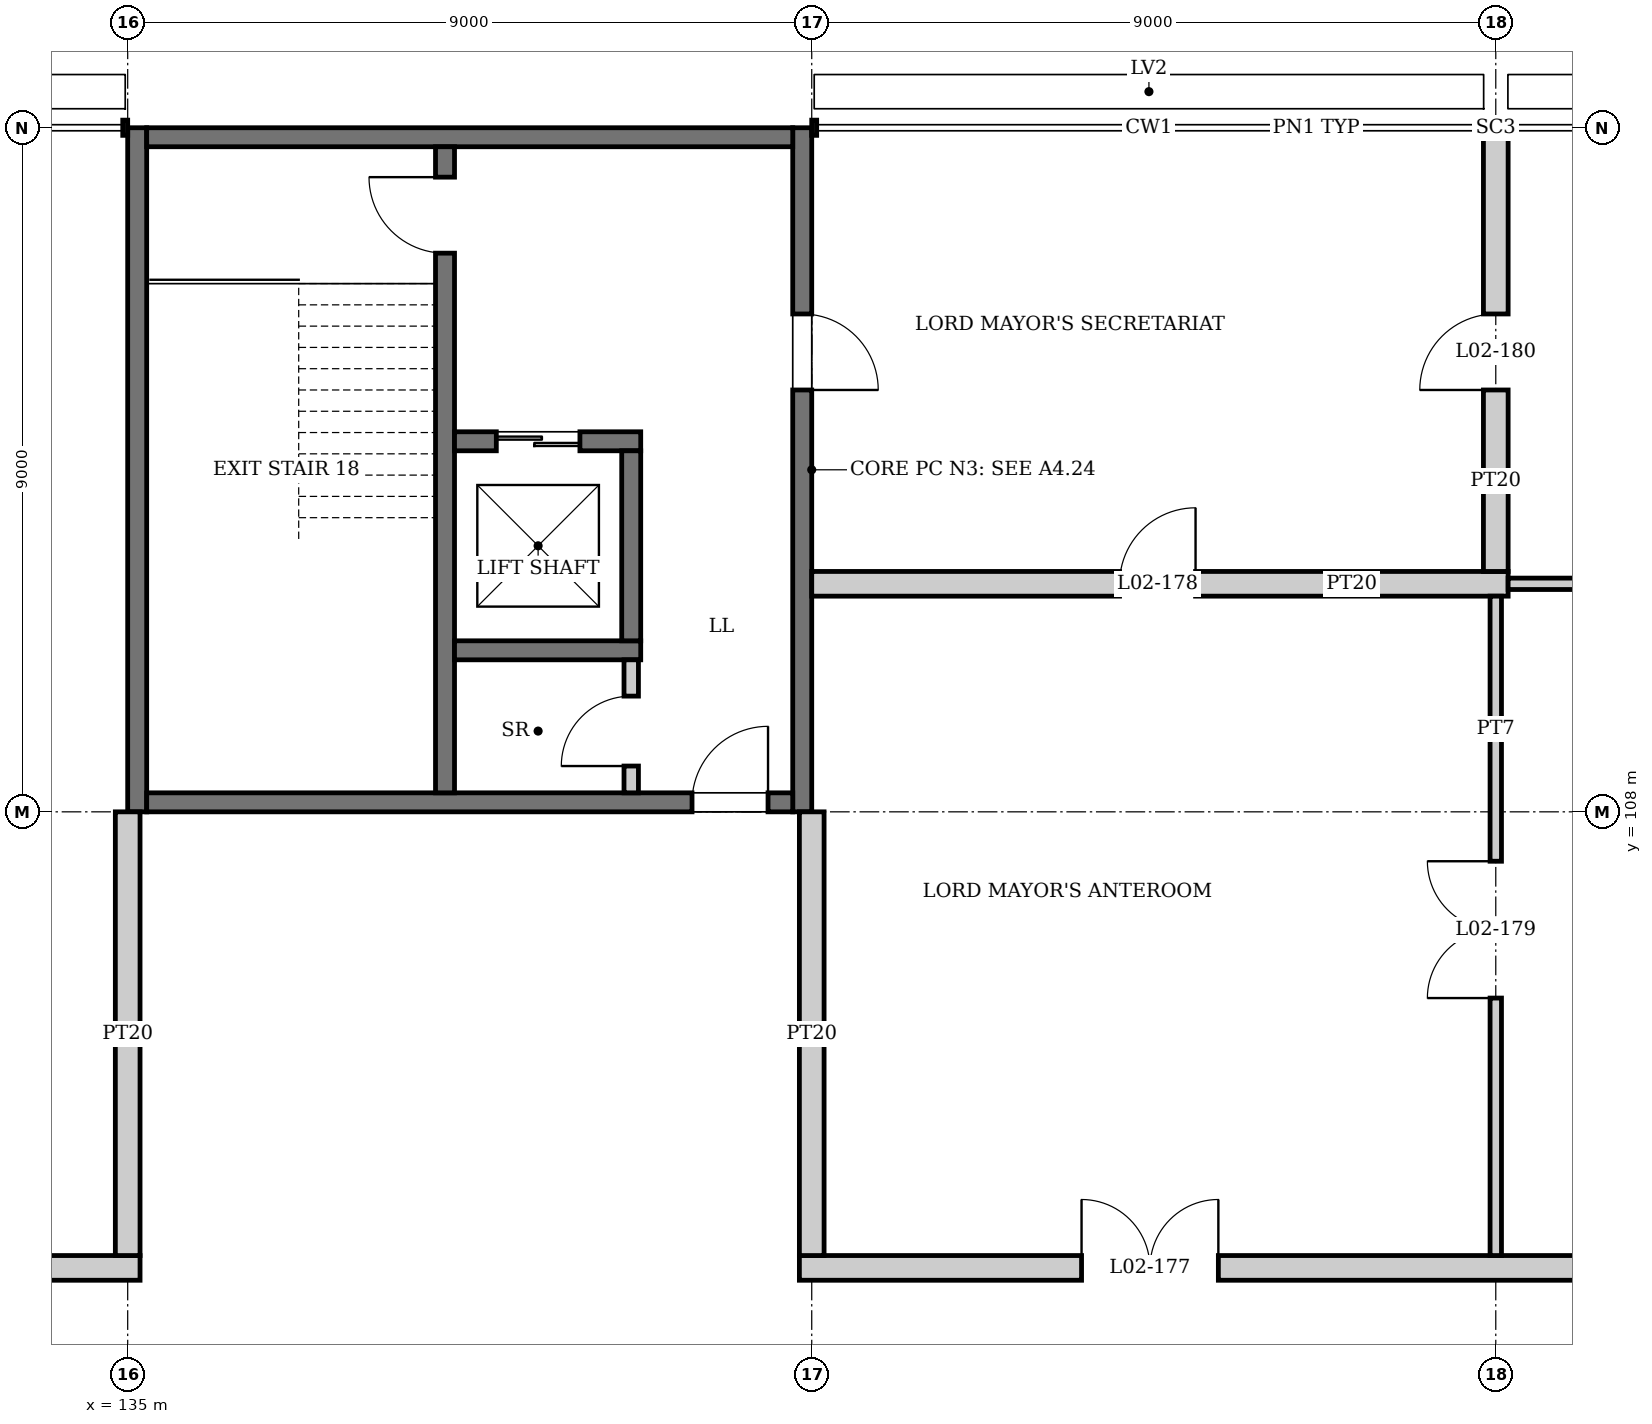
"""IFC4 building model, lengths in metres.
Left out: names, types, materials, properties, quantities, classifications, styles, units other than length and angle.
Written with IfcOpenShell. Run it as: python <this file> out.ifc"""

import sys

from ifc_helpers import new_model, si_unit, direction, frame, frame_2d, origin, origin_2d, place, context, subcontext, project, spatial, rectangle, i_section, extrude, element, fill, save


model = new_model("IFC4")
c1 = context("Model", 3, precision=1e-05, world=origin(), true_north=direction((0.0, 1.0)))
c2 = subcontext(c1, "Body", "Model", "MODEL_VIEW")
j1 = project(units=[si_unit("LENGTHUNIT", "METRE"), si_unit("PLANEANGLEUNIT", "RADIAN")], contexts=[c1])
p1 = place(None, origin())
s1 = spatial("IfcSite", under=j1, at=p1, CompositionType="ELEMENT")
p2 = place(p1, origin())
s2 = spatial("IfcBuilding", under=s1, at=p2, CompositionType="ELEMENT")
p3 = place(p2, frame((0.0, 0.0, 10.5)))
s3 = spatial("IfcBuildingStorey", under=s2, at=p3, CompositionType="ELEMENT", Elevation=10.5)
p4 = place(p3, frame((153.0, 117.0, 0.0), z_axis=(0.0, 0.0, 1.0), x_axis=(0.0, 1.0, 0.0)))
e1 = element("IfcColumn", 1, at=p4, inside=s3, PredefinedType="COLUMN", context=c2, shape_type="SweptSolid", body=[
    extrude(i_section(OverallWidth=0.254, OverallDepth=0.254, WebThickness=0.009, FlangeThickness=0.014, at=origin_2d()), origin(), (0.0, 0.0, 1.0), 4.5),
])
p5 = place(p3, frame((135.125, 108.0, 0.0), z_axis=(0.0, 0.0, 1.0), x_axis=(0.0, 1.0, 0.0)))
e2 = element("IfcWall", 2, at=p5, inside=s3, PredefinedType="SHEAR", context=c2, shape_type="SweptSolid", body=[
    extrude(rectangle(XDim=9.0, YDim=0.25, at=frame_2d((4.5, 0.0))), origin(), (0.0, 0.0, 1.0), 4.35),
])
p6 = place(p3, frame((143.875, 108.0, 0.0), z_axis=(0.0, 0.0, 1.0), x_axis=(0.0, 1.0, 0.0)))
e3 = element("IfcWall", 3, at=p6, inside=s3, PredefinedType="SHEAR", context=c2, shape_type="SweptSolid", body=[
    extrude(rectangle(XDim=9.0, YDim=0.25, at=frame_2d((4.5, 0.0))), origin(), (0.0, 0.0, 1.0), 4.35),
])
p7 = place(p6, frame((5.55, 0.0, 0.0)))
e4 = element("IfcOpeningElement", 4, at=p7, cuts=e3, PredefinedType="OPENING", context=c2, shape_type="SweptSolid", body=[
    extrude(rectangle(XDim=1.0, YDim=2.1, at=frame_2d((0.5, 1.05))), frame((0.0, 0.135, 0.0), z_axis=(0.0, -1.0, 0.0), x_axis=(1.0, 0.0, 0.0)), (0.0, 0.0, 1.0), 0.27),
])
p8 = place(p3, frame((135.25, 108.125, 0.0), z_axis=(0.0, 0.0, 1.0), x_axis=(1.0, 0.0, 0.0)))
e5 = element("IfcWall", 5, at=p8, inside=s3, PredefinedType="SHEAR", context=c2, shape_type="SweptSolid", body=[
    extrude(rectangle(XDim=8.5, YDim=0.25, at=frame_2d((4.25, 0.0))), origin(), (0.0, 0.0, 1.0), 4.35),
])
p9 = place(p8, frame((7.175, 0.0, 0.0)))
e6 = element("IfcOpeningElement", 6, at=p9, cuts=e5, PredefinedType="OPENING", context=c2, shape_type="SweptSolid", body=[
    extrude(rectangle(XDim=1.0, YDim=2.1, at=frame_2d((0.5, 1.05))), frame((0.0, 0.135, 0.0), z_axis=(0.0, -1.0, 0.0), x_axis=(1.0, 0.0, 0.0)), (0.0, 0.0, 1.0), 0.27),
])
p10 = place(p3, frame((135.25, 116.875, 0.0), z_axis=(0.0, 0.0, 1.0), x_axis=(1.0, 0.0, 0.0)))
e7 = element("IfcWall", 7, at=p10, inside=s3, PredefinedType="SHEAR", context=c2, shape_type="SweptSolid", body=[
    extrude(rectangle(XDim=8.5, YDim=0.25, at=frame_2d((4.25, 0.0))), origin(), (0.0, 0.0, 1.0), 4.35),
])
p11 = place(p3, frame((139.175, 116.75, 0.0), z_axis=(0.0, 0.0, 1.0), x_axis=(0.0, -1.0, 0.0)))
e8 = element("IfcWall", 8, at=p11, inside=s3, PredefinedType="SOLIDWALL", context=c2, shape_type="SweptSolid", body=[
    extrude(rectangle(XDim=8.5, YDim=0.25, at=frame_2d((4.25, 0.0))), origin(), (0.0, 0.0, 1.0), 4.35),
])
p12 = place(p11, frame((0.4, 0.0, 0.0)))
e9 = element("IfcOpeningElement", 9, at=p12, cuts=e8, PredefinedType="OPENING", context=c2, shape_type="SweptSolid", body=[
    extrude(rectangle(XDim=1.0, YDim=2.1, at=frame_2d((0.5, 1.05))), frame((0.0, 0.135, 0.0), z_axis=(0.0, -1.0, 0.0), x_axis=(1.0, 0.0, 0.0)), (0.0, 0.0, 1.0), 0.27),
])
p13 = place(p3, frame((139.3, 110.125, 0.0), z_axis=(0.0, 0.0, 1.0), x_axis=(1.0, 0.0, 0.0)))
e10 = element("IfcWall", 10, at=p13, inside=s3, PredefinedType="SOLIDWALL", context=c2, shape_type="SweptSolid", body=[
    extrude(rectangle(XDim=2.45, YDim=0.25, at=frame_2d((1.225, 0.0))), origin(), (0.0, 0.0, 1.0), 4.35),
])
p14 = place(p3, frame((139.3, 112.875, 0.0), z_axis=(0.0, 0.0, 1.0), x_axis=(1.0, 0.0, 0.0)))
e11 = element("IfcWall", 11, at=p14, inside=s3, PredefinedType="SOLIDWALL", context=c2, shape_type="SweptSolid", body=[
    extrude(rectangle(XDim=2.45, YDim=0.25, at=frame_2d((1.225, 0.0))), origin(), (0.0, 0.0, 1.0), 4.35),
])
p15 = place(p14, frame((0.55, 0.0, 0.0)))
e12 = element("IfcOpeningElement", 12, at=p15, cuts=e11, PredefinedType="OPENING", context=c2, shape_type="SweptSolid", body=[
    extrude(rectangle(XDim=1.1, YDim=2.1, at=frame_2d((0.55, 1.05))), frame((0.0, 0.135, 0.0), z_axis=(0.0, -1.0, 0.0), x_axis=(1.0, 0.0, 0.0)), (0.0, 0.0, 1.0), 0.27),
])
p16 = place(p3, frame((141.625, 110.25, 0.0), z_axis=(0.0, 0.0, 1.0), x_axis=(0.0, 1.0, 0.0)))
e13 = element("IfcWall", 13, at=p16, inside=s3, PredefinedType="SOLIDWALL", context=c2, shape_type="SweptSolid", body=[
    extrude(rectangle(XDim=2.5, YDim=0.25, at=frame_2d((1.25, 0.0))), origin(), (0.0, 0.0, 1.0), 4.35),
])
p17 = place(p3, frame((107.837, 102.0, 0.0), z_axis=(0.0, 0.0, 1.0), x_axis=(1.0, 0.0, 0.0)))
e14 = element("IfcWall", 14, at=p17, inside=s3, PredefinedType="PARTITIONING", context=c2, shape_type="SweptSolid", body=[
    extrude(rectangle(XDim=27.325, YDim=0.325, at=frame_2d((13.663, 0.0))), origin(), (0.0, 0.0, 1.0), 3.65),
])
p18 = place(p17, frame((5.962, 0.0, 0.0)))
e15 = element("IfcOpeningElement", 15, at=p18, cuts=e14, PredefinedType="OPENING", context=c2, shape_type="SweptSolid", body=[
    extrude(rectangle(XDim=1.8, YDim=2.4, at=frame_2d((0.9, 1.2))), frame((0.0, 0.172, 0.0), z_axis=(0.0, -1.0, 0.0), x_axis=(1.0, 0.0, 0.0)), (0.0, 0.0, 1.0), 0.345),
])
p19 = place(p17, frame((19.462, 0.0, 0.0)))
e16 = element("IfcOpeningElement", 16, at=p19, cuts=e14, PredefinedType="OPENING", context=c2, shape_type="SweptSolid", body=[
    extrude(rectangle(XDim=1.8, YDim=2.4, at=frame_2d((0.9, 1.2))), frame((0.0, 0.172, 0.0), z_axis=(0.0, -1.0, 0.0), x_axis=(1.0, 0.0, 0.0)), (0.0, 0.0, 1.0), 0.345),
])
p20 = place(p3, frame((143.837, 102.0, 0.0), z_axis=(0.0, 0.0, 1.0), x_axis=(1.0, 0.0, 0.0)))
e17 = element("IfcWall", 17, at=p20, inside=s3, PredefinedType="PARTITIONING", context=c2, shape_type="SweptSolid", body=[
    extrude(rectangle(XDim=27.325, YDim=0.325, at=frame_2d((13.663, 0.0))), origin(), (0.0, 0.0, 1.0), 3.65),
])
p21 = place(p20, frame((3.712, 0.0, 0.0)))
e18 = element("IfcOpeningElement", 18, at=p21, cuts=e17, PredefinedType="OPENING", context=c2, shape_type="SweptSolid", body=[
    extrude(rectangle(XDim=1.8, YDim=2.4, at=frame_2d((0.9, 1.2))), frame((0.0, 0.172, 0.0), z_axis=(0.0, -1.0, 0.0), x_axis=(1.0, 0.0, 0.0)), (0.0, 0.0, 1.0), 0.345),
])
p22 = place(p3, frame((144.0, 111.0, 0.0), z_axis=(0.0, 0.0, 1.0), x_axis=(1.0, 0.0, 0.0)))
e19 = element("IfcWall", 19, at=p22, inside=s3, PredefinedType="PARTITIONING", context=c2, shape_type="SweptSolid", body=[
    extrude(rectangle(XDim=9.163, YDim=0.325, at=frame_2d((4.581, 0.0))), origin(), (0.0, 0.0, 1.0), 3.65),
])
p23 = place(p22, frame((4.05, 0.0, 0.0)))
e20 = element("IfcOpeningElement", 20, at=p23, cuts=e19, PredefinedType="OPENING", context=c2, shape_type="SweptSolid", body=[
    extrude(rectangle(XDim=1.0, YDim=2.1, at=frame_2d((0.5, 1.05))), frame((0.0, 0.172, 0.0), z_axis=(0.0, -1.0, 0.0), x_axis=(1.0, 0.0, 0.0)), (0.0, 0.0, 1.0), 0.345),
])
p24 = place(p3, frame((153.163, 111.0, 0.0), z_axis=(0.0, 0.0, 1.0), x_axis=(1.0, 0.0, 0.0)))
e21 = element("IfcWall", 21, at=p24, inside=s3, PredefinedType="PARTITIONING", context=c2, shape_type="SweptSolid", body=[
    extrude(rectangle(XDim=17.837, YDim=0.15, at=frame_2d((8.919, 0.0))), origin(), (0.0, 0.0, 1.0), 3.65),
])
p25 = place(p24, frame((8.387, 0.0, 0.0)))
e22 = element("IfcOpeningElement", 22, at=p25, cuts=e21, PredefinedType="OPENING", context=c2, shape_type="SweptSolid", body=[
    extrude(rectangle(XDim=1.0, YDim=2.1, at=frame_2d((0.5, 1.05))), frame((0.0, 0.085, 0.0), z_axis=(0.0, -1.0, 0.0), x_axis=(1.0, 0.0, 0.0)), (0.0, 0.0, 1.0), 0.17),
])
p26 = place(p3, frame((135.0, 102.163, 0.0), z_axis=(0.0, 0.0, 1.0), x_axis=(0.0, 1.0, 0.0)))
e23 = element("IfcWall", 23, at=p26, inside=s3, PredefinedType="PARTITIONING", context=c2, shape_type="SweptSolid", body=[
    extrude(rectangle(XDim=5.837, YDim=0.325, at=frame_2d((2.919, 0.0))), origin(), (0.0, 0.0, 1.0), 3.998),
])
p27 = place(p3, frame((141.625, 108.25, 0.0), z_axis=(0.0, 0.0, 1.0), x_axis=(0.0, 1.0, 0.0)))
e24 = element("IfcWall", 24, at=p27, inside=s3, PredefinedType="PARTITIONING", context=c2, shape_type="SweptSolid", body=[
    extrude(rectangle(XDim=1.75, YDim=0.19, at=frame_2d((0.875, 0.0))), origin(), (0.0, 0.0, 1.0), 4.35),
])
p28 = place(p27, frame((0.353, 0.0, 0.0)))
e25 = element("IfcOpeningElement", 25, at=p28, cuts=e24, PredefinedType="OPENING", context=c2, shape_type="SweptSolid", body=[
    extrude(rectangle(XDim=0.92, YDim=2.1, at=frame_2d((0.46, 1.05))), frame((0.0, 0.105, 0.0), z_axis=(0.0, -1.0, 0.0), x_axis=(1.0, 0.0, 0.0)), (0.0, 0.0, 1.0), 0.21),
])
p29 = place(p3, frame((144.0, 102.163, 0.0), z_axis=(0.0, 0.0, 1.0), x_axis=(0.0, 1.0, 0.0)))
e26 = element("IfcWall", 26, at=p29, inside=s3, PredefinedType="PARTITIONING", context=c2, shape_type="SweptSolid", body=[
    extrude(rectangle(XDim=5.837, YDim=0.325, at=frame_2d((2.919, 0.0))), origin(), (0.0, 0.0, 1.0), 3.998),
])
p30 = place(p3, frame((153.0, 102.163, 0.0), z_axis=(0.0, 0.0, 1.0), x_axis=(0.0, 1.0, 0.0)))
e27 = element("IfcWall", 27, at=p30, inside=s3, PredefinedType="PARTITIONING", context=c2, shape_type="SweptSolid", body=[
    extrude(rectangle(XDim=8.675, YDim=0.15, at=frame_2d((4.337, 0.0))), origin(), (0.0, 0.0, 1.0), 3.65),
])
p31 = place(p30, frame((3.387, 0.0, 0.0)))
e28 = element("IfcOpeningElement", 28, at=p31, cuts=e27, PredefinedType="OPENING", context=c2, shape_type="SweptSolid", body=[
    extrude(rectangle(XDim=1.8, YDim=2.4, at=frame_2d((0.9, 1.2))), frame((0.0, 0.085, 0.0), z_axis=(0.0, -1.0, 0.0), x_axis=(1.0, 0.0, 0.0)), (0.0, 0.0, 1.0), 0.17),
])
p32 = place(p3, frame((153.0, 111.163, 0.0), z_axis=(0.0, 0.0, 1.0), x_axis=(0.0, 1.0, 0.0)))
e29 = element("IfcWall", 29, at=p32, inside=s3, PredefinedType="PARTITIONING", context=c2, shape_type="SweptSolid", body=[
    extrude(rectangle(XDim=5.71, YDim=0.325, at=frame_2d((2.855, 0.0))), origin(), (0.0, 0.0, 1.0), 3.65),
])
p33 = place(p32, frame((2.387, 0.0, 0.0)))
e30 = element("IfcOpeningElement", 30, at=p33, cuts=e29, PredefinedType="OPENING", context=c2, shape_type="SweptSolid", body=[
    extrude(rectangle(XDim=1.0, YDim=2.1, at=frame_2d((0.5, 1.05))), frame((0.0, 0.172, 0.0), z_axis=(0.0, -1.0, 0.0), x_axis=(1.0, 0.0, 0.0)), (0.0, 0.0, 1.0), 0.345),
])
p34 = place(p15, origin())
e31 = element("IfcDoor", 31, at=p34, inside=s3, OperationType="DOUBLE_DOOR_SLIDING", PredefinedType="DOOR", context=c2, shape_type="SweptSolid", body=[
    extrude(rectangle(XDim=1.1, YDim=2.1, at=frame_2d((0.55, 1.05))), frame((0.0, 0.025, 0.0), z_axis=(0.0, -1.0, 0.0), x_axis=(1.0, 0.0, 0.0)), (0.0, 0.0, 1.0), 0.05),
])
fill(e12, e31)
p35 = place(p12, frame((1.0, 0.0, 0.0), z_axis=(0.0, 0.0, 1.0), x_axis=(-1.0, 0.0, 0.0)))
e32 = element("IfcDoor", 32, at=p35, inside=s3, OperationType="SINGLE_SWING_RIGHT", PredefinedType="DOOR", context=c2, shape_type="SweptSolid", body=[
    extrude(rectangle(XDim=1.0, YDim=2.1, at=frame_2d((0.5, 1.05))), frame((0.0, 0.025, 0.0), z_axis=(0.0, -1.0, 0.0), x_axis=(1.0, 0.0, 0.0)), (0.0, 0.0, 1.0), 0.05),
])
fill(e9, e32)
p36 = place(p28, origin())
e33 = element("IfcDoor", 33, at=p36, inside=s3, OperationType="SINGLE_SWING_LEFT", PredefinedType="DOOR", context=c2, shape_type="SweptSolid", body=[
    extrude(rectangle(XDim=0.92, YDim=2.1, at=frame_2d((0.46, 1.05))), frame((0.0, 0.025, 0.0), z_axis=(0.0, -1.0, 0.0), x_axis=(1.0, 0.0, 0.0)), (0.0, 0.0, 1.0), 0.05),
])
fill(e25, e33)
p37 = place(p9, origin())
e34 = element("IfcDoor", 34, at=p37, inside=s3, OperationType="SINGLE_SWING_RIGHT", PredefinedType="DOOR", context=c2, shape_type="SweptSolid", body=[
    extrude(rectangle(XDim=1.0, YDim=2.1, at=frame_2d((0.5, 1.05))), frame((0.0, 0.025, 0.0), z_axis=(0.0, -1.0, 0.0), x_axis=(1.0, 0.0, 0.0)), (0.0, 0.0, 1.0), 0.05),
])
fill(e6, e34)
p38 = place(p7, frame((1.0, 0.0, 0.0), z_axis=(0.0, 0.0, 1.0), x_axis=(-1.0, 0.0, 0.0)))
e35 = element("IfcDoor", 35, at=p38, inside=s3, OperationType="SINGLE_SWING_RIGHT", PredefinedType="DOOR", context=c2, shape_type="SweptSolid", body=[
    extrude(rectangle(XDim=1.0, YDim=2.1, at=frame_2d((0.5, 1.05))), frame((0.0, 0.025, 0.0), z_axis=(0.0, -1.0, 0.0), x_axis=(1.0, 0.0, 0.0)), (0.0, 0.0, 1.0), 0.05),
])
fill(e4, e35)
p39 = place(p21, origin())
e36 = element("IfcDoor", 36, at=p39, inside=s3, OperationType="DOUBLE_DOOR_SINGLE_SWING", PredefinedType="DOOR", context=c2, shape_type="SweptSolid", body=[
    extrude(rectangle(XDim=1.8, YDim=2.4, at=frame_2d((0.9, 1.2))), frame((0.0, 0.025, 0.0), z_axis=(0.0, -1.0, 0.0), x_axis=(1.0, 0.0, 0.0)), (0.0, 0.0, 1.0), 0.05),
])
fill(e18, e36)
p40 = place(p23, origin())
e37 = element("IfcDoor", 37, at=p40, inside=s3, OperationType="SINGLE_SWING_RIGHT", PredefinedType="DOOR", context=c2, shape_type="SweptSolid", body=[
    extrude(rectangle(XDim=1.0, YDim=2.1, at=frame_2d((0.5, 1.05))), frame((0.0, 0.025, 0.0), z_axis=(0.0, -1.0, 0.0), x_axis=(1.0, 0.0, 0.0)), (0.0, 0.0, 1.0), 0.05),
])
fill(e20, e37)
p41 = place(p31, origin())
e38 = element("IfcDoor", 38, at=p41, inside=s3, OperationType="DOUBLE_DOOR_SINGLE_SWING", PredefinedType="DOOR", context=c2, shape_type="SweptSolid", body=[
    extrude(rectangle(XDim=1.8, YDim=2.4, at=frame_2d((0.9, 1.2))), frame((0.0, 0.025, 0.0), z_axis=(0.0, -1.0, 0.0), x_axis=(1.0, 0.0, 0.0)), (0.0, 0.0, 1.0), 0.05),
])
fill(e28, e38)
p42 = place(p33, origin())
e39 = element("IfcDoor", 39, at=p42, inside=s3, OperationType="SINGLE_SWING_LEFT", PredefinedType="DOOR", context=c2, shape_type="SweptSolid", body=[
    extrude(rectangle(XDim=1.0, YDim=2.1, at=frame_2d((0.5, 1.05))), frame((0.0, 0.025, 0.0), z_axis=(0.0, -1.0, 0.0), x_axis=(1.0, 0.0, 0.0)), (0.0, 0.0, 1.0), 0.05),
])
fill(e30, e39)
save(model, sys.argv[1])
